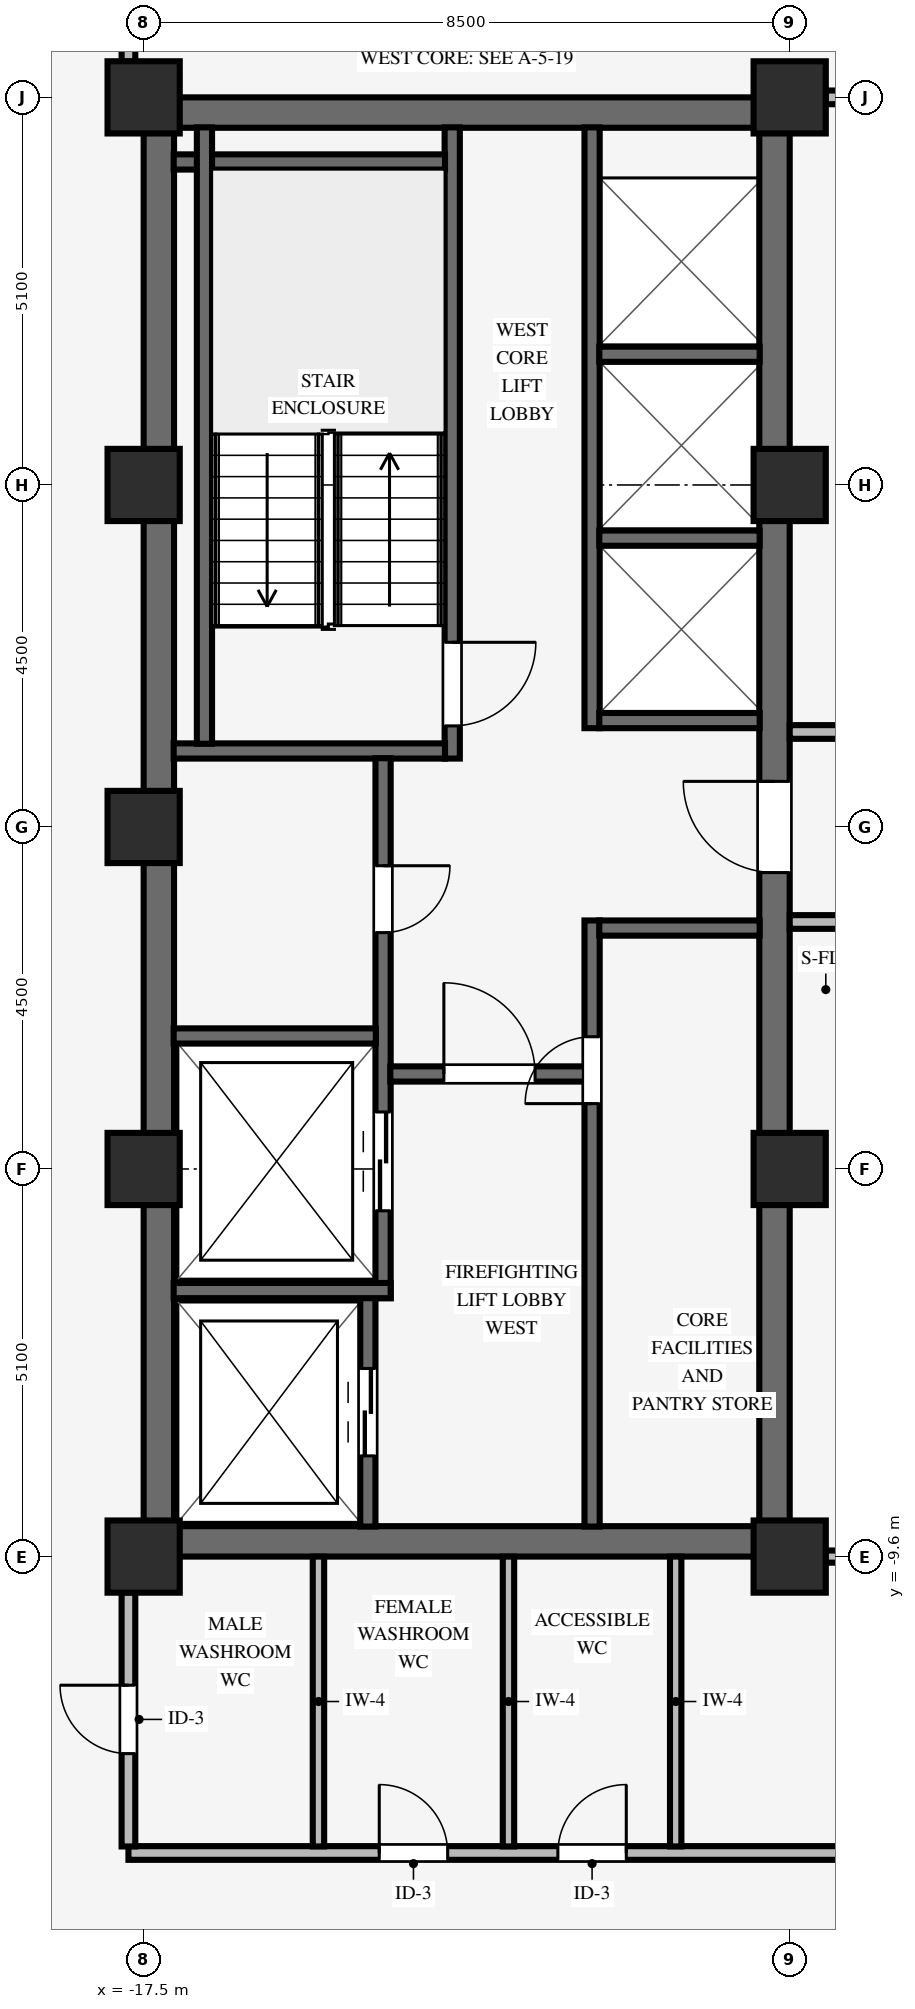
"""IFC4 building model, lengths in metres.
Left out: names, types, materials, properties, quantities, classifications, styles, units other than length and angle.
Written with IfcOpenShell. Run it as: python <this file> out.ifc"""

import sys

from ifc_helpers import new_model, si_unit, direction, frame, frame_2d, origin, origin_2d, place, context, subcontext, project, spatial, rectangle, extrude, source, transform, mapped, element, fill, save


model = new_model("IFC4")
c1 = context("Model", 3, precision=1e-05, world=origin(), true_north=direction((0.0, 1.0)))
c2 = subcontext(c1, "Body", "Model", "MODEL_VIEW")
j1 = project(units=[si_unit("LENGTHUNIT", "METRE"), si_unit("PLANEANGLEUNIT", "RADIAN")], contexts=[c1])
p1 = place(None, origin())
s1 = spatial("IfcSite", under=j1, at=p1, CompositionType="ELEMENT")
p2 = place(p1, origin())
s2 = spatial("IfcBuilding", under=s1, at=p2, CompositionType="ELEMENT")
p3 = place(p2, frame((0.0, 0.0, 167.65)))
s3 = spatial("IfcBuildingStorey", under=s2, at=p3, CompositionType="ELEMENT", Elevation=167.65)
for number, where, z_axis, x_axis in (
    (1, (-17.5, -9.4, 0.0), (0.0, 0.0, 1.0), (1.0, 0.0, 0.0)),
    (2, (-17.5, 9.4, 0.0), (0.0, 0.0, 1.0), (1.0, 0.0, 0.0)),
):
    element("IfcWall", number, at=place(p3, frame(where, z_axis=z_axis, x_axis=x_axis)), inside=s3, PredefinedType="SHEAR", context=c2, shape_type="SweptSolid", body=[
        extrude(rectangle(XDim=8.5, YDim=0.4, at=frame_2d((4.25, 0.0))), origin(), (0.0, 0.0, 1.0), 3.37),
    ])
p4 = place(p3, frame((-17.3, -9.205, 0.0), z_axis=(0.0, 0.0, 1.0), x_axis=(0.0, 1.0, 0.0)))
e3 = element("IfcWall", 3, at=p4, inside=s3, PredefinedType="SHEAR", context=c2, shape_type="SweptSolid", body=[
    extrude(rectangle(XDim=18.41, YDim=0.4, at=frame_2d((9.205, 0.0))), origin(), (0.0, 0.0, 1.0), 3.37),
])
p5 = place(p3, frame((-9.2, -9.205, 0.0), z_axis=(0.0, 0.0, 1.0), x_axis=(0.0, 1.0, 0.0)))
e4 = element("IfcWall", 4, at=p5, inside=s3, PredefinedType="SHEAR", context=c2, shape_type="SweptSolid", body=[
    extrude(rectangle(XDim=18.41, YDim=0.4, at=frame_2d((9.205, 0.0))), origin(), (0.0, 0.0, 1.0), 3.37),
])
p6 = place(p5, frame((8.605, 0.0, 0.0)))
e5 = element("IfcOpeningElement", 5, at=p6, cuts=e4, PredefinedType="OPENING", context=c2, shape_type="SweptSolid", body=[
    extrude(rectangle(XDim=1.2, YDim=2.15, at=frame_2d((0.6, 1.075))), frame((0.0, 0.21, 0.0), z_axis=(0.0, -1.0, 0.0), x_axis=(1.0, 0.0, 0.0)), (0.0, 0.0, 1.0), 0.42),
])
for number, where, z_axis, x_axis in (
    (6, (-17.5, -9.6, 0.0), (0.0, 0.0, 1.0), (1.0, 0.0, 0.0)),
    (7, (-17.5, -4.5, 0.0), (0.0, 0.0, 1.0), (1.0, 0.0, 0.0)),
    (8, (-17.5, 4.5, 0.0), (0.0, 0.0, 1.0), (1.0, 0.0, 0.0)),
    (9, (-17.5, 9.6, 0.0), (0.0, 0.0, 1.0), (1.0, 0.0, 0.0)),
    (10, (-9.0, -9.6, 0.0), (0.0, 0.0, 1.0), (1.0, 0.0, 0.0)),
    (11, (-9.0, -4.5, 0.0), (0.0, 0.0, 1.0), (1.0, 0.0, 0.0)),
    (12, (-9.0, 4.5, 0.0), (0.0, 0.0, 1.0), (1.0, 0.0, 0.0)),
    (13, (-9.0, 9.6, 0.0), (0.0, 0.0, 1.0), (1.0, 0.0, 0.0)),
    (14, (-17.5, 0.0, 0.0), (0.0, 0.0, 1.0), (1.0, 0.0, 0.0)),
):
    element("IfcColumn", number, at=place(p3, frame(where, z_axis=z_axis, x_axis=x_axis)), inside=s3, PredefinedType="COLUMN", context=c2, shape_type="SweptSolid", body=[
        extrude(rectangle(XDim=0.95, YDim=0.95, at=origin_2d()), origin(), (0.0, 0.0, 1.0), 3.37),
    ])
p7 = place(p3, frame((-13.44, 0.9, 0.0), z_axis=(0.0, 0.0, 1.0), x_axis=(0.0, 1.0, 0.0)))
e15 = element("IfcWall", 15, at=p7, inside=s3, PredefinedType="SHEAR", context=c2, shape_type="SweptSolid", body=[
    extrude(rectangle(XDim=8.305, YDim=0.2, at=frame_2d((4.153, 0.0))), origin(), (0.0, 0.0, 1.0), 3.37),
])
p8 = place(p7, frame((1.53, 0.0, 0.0), z_axis=(0.0, 0.0, 1.0), x_axis=(-1.0, 0.0, 0.0)))
e16 = element("IfcOpeningElement", 16, at=p8, cuts=e15, PredefinedType="OPENING", context=c2, shape_type="SweptSolid", body=[
    extrude(rectangle(XDim=1.1, YDim=2.15, at=frame_2d((0.55, 1.075))), frame((0.0, 0.11, 0.0), z_axis=(0.0, -1.0, 0.0), x_axis=(1.0, 0.0, 0.0)), (0.0, 0.0, 1.0), 0.22),
])
for number, where, z_axis, x_axis in (
    (17, (-17.105, 1.0, 0.0), (0.0, 0.0, 1.0), (1.0, 0.0, 0.0)),
    (18, (-17.105, 8.75, 0.0), (0.0, 0.0, 1.0), (1.0, 0.0, 0.0)),
):
    element("IfcWall", number, at=place(p3, frame(where, z_axis=z_axis, x_axis=x_axis)), inside=s3, PredefinedType="SHEAR", context=c2, shape_type="SweptSolid", body=[
        extrude(rectangle(XDim=3.57, YDim=0.2, at=frame_2d((1.785, 0.0))), origin(), (0.0, 0.0, 1.0), 3.37),
    ])
p9 = place(p3, frame((-16.7, 1.095, 0.0), z_axis=(0.0, 0.0, 1.0), x_axis=(0.0, 1.0, 0.0)))
e19 = element("IfcWall", 19, at=p9, inside=s3, PredefinedType="SHEAR", context=c2, shape_type="SweptSolid", body=[
    extrude(rectangle(XDim=8.11, YDim=0.2, at=frame_2d((4.055, 0.0))), origin(), (0.0, 0.0, 1.0), 3.37),
])
p10 = place(p3, frame((-14.55, -9.205, 0.0), z_axis=(0.0, 0.0, 1.0), x_axis=(0.0, 1.0, 0.0)))
e20 = element("IfcWall", 20, at=p10, inside=s3, PredefinedType="SHEAR", context=c2, shape_type="SweptSolid", body=[
    extrude(rectangle(XDim=3.01, YDim=0.2, at=frame_2d((1.505, 0.0))), origin(), (0.0, 0.0, 1.0), 3.37),
])
p11 = place(p10, frame((0.93, 0.0, 0.0)))
e21 = element("IfcOpeningElement", 21, at=p11, cuts=e20, PredefinedType="OPENING", context=c2, shape_type="SweptSolid", body=[
    extrude(rectangle(XDim=1.15, YDim=2.15, at=frame_2d((0.575, 1.075))), frame((0.0, 0.11, 0.0), z_axis=(0.0, -1.0, 0.0), x_axis=(1.0, 0.0, 0.0)), (0.0, 0.0, 1.0), 0.22),
])
p12 = place(p3, frame((-14.35, -6.2, 0.0), z_axis=(0.0, 0.0, 1.0), x_axis=(0.0, 1.0, 0.0)))
e22 = element("IfcWall", 22, at=p12, inside=s3, PredefinedType="SHEAR", context=c2, shape_type="SweptSolid", body=[
    extrude(rectangle(XDim=7.105, YDim=0.2, at=frame_2d((3.552, 0.0))), origin(), (0.0, 0.0, 1.0), 3.37),
])
p13 = place(p12, frame((5.69, 0.0, 0.0), z_axis=(0.0, 0.0, 1.0), x_axis=(-1.0, 0.0, 0.0)))
e23 = element("IfcOpeningElement", 23, at=p13, cuts=e22, PredefinedType="OPENING", context=c2, shape_type="SweptSolid", body=[
    extrude(rectangle(XDim=0.88, YDim=2.1, at=frame_2d((0.44, 1.05))), frame((0.0, 0.11, 0.0), z_axis=(0.0, -1.0, 0.0), x_axis=(1.0, 0.0, 0.0)), (0.0, 0.0, 1.0), 0.22),
])
p14 = place(p12, frame((1.15, 0.0, 0.0)))
e24 = element("IfcOpeningElement", 24, at=p14, cuts=e22, PredefinedType="OPENING", context=c2, shape_type="SweptSolid", body=[
    extrude(rectangle(XDim=1.3, YDim=2.2, at=frame_2d((0.65, 1.1))), frame((0.0, 0.11, 0.0), z_axis=(0.0, -1.0, 0.0), x_axis=(1.0, 0.0, 0.0)), (0.0, 0.0, 1.0), 0.22),
])
p15 = place(p3, frame((-17.105, -6.1, 0.0), z_axis=(0.0, 0.0, 1.0), x_axis=(1.0, 0.0, 0.0)))
e25 = element("IfcWall", 25, at=p15, inside=s3, PredefinedType="SHEAR", context=c2, shape_type="SweptSolid", body=[
    extrude(rectangle(XDim=2.855, YDim=0.2, at=frame_2d((1.427, 0.0))), origin(), (0.0, 0.0, 1.0), 3.37),
])
p16 = place(p3, frame((-17.105, -2.75, 0.0), z_axis=(0.0, 0.0, 1.0), x_axis=(1.0, 0.0, 0.0)))
e26 = element("IfcWall", 26, at=p16, inside=s3, PredefinedType="SHEAR", context=c2, shape_type="SweptSolid", body=[
    extrude(rectangle(XDim=2.66, YDim=0.2, at=frame_2d((1.33, 0.0))), origin(), (0.0, 0.0, 1.0), 3.37),
])
p17 = place(p3, frame((-11.6, -9.205, 0.0), z_axis=(0.0, 0.0, 1.0), x_axis=(0.0, 1.0, 0.0)))
e27 = element("IfcWall", 27, at=p17, inside=s3, PredefinedType="SHEAR", context=c2, shape_type="SweptSolid", body=[
    extrude(rectangle(XDim=7.975, YDim=0.2, at=frame_2d((3.988, 0.0))), origin(), (0.0, 0.0, 1.0), 3.37),
])
p18 = place(p17, frame((5.565, 0.0, 0.0)))
e28 = element("IfcOpeningElement", 28, at=p18, cuts=e27, PredefinedType="OPENING", context=c2, shape_type="SweptSolid", body=[
    extrude(rectangle(XDim=0.88, YDim=2.1, at=frame_2d((0.44, 1.05))), frame((0.0, 0.11, 0.0), z_axis=(0.0, -1.0, 0.0), x_axis=(1.0, 0.0, 0.0)), (0.0, 0.0, 1.0), 0.22),
])
p19 = place(p3, frame((-14.255, -3.25, 0.0), z_axis=(0.0, 0.0, 1.0), x_axis=(1.0, 0.0, 0.0)))
e29 = element("IfcWall", 29, at=p19, inside=s3, PredefinedType="SHEAR", context=c2, shape_type="SweptSolid", body=[
    extrude(rectangle(XDim=2.56, YDim=0.2, at=frame_2d((1.28, 0.0))), origin(), (0.0, 0.0, 1.0), 3.37),
])
p20 = place(p19, frame((0.705, 0.0, 0.0)))
e30 = element("IfcOpeningElement", 30, at=p20, cuts=e29, PredefinedType="OPENING", context=c2, shape_type="SweptSolid", body=[
    extrude(rectangle(XDim=1.2, YDim=2.15, at=frame_2d((0.6, 1.075))), frame((0.0, 0.11, 0.0), z_axis=(0.0, -1.0, 0.0), x_axis=(1.0, 0.0, 0.0)), (0.0, 0.0, 1.0), 0.22),
])
p21 = place(p3, frame((-11.505, -1.33, 0.0), z_axis=(0.0, 0.0, 1.0), x_axis=(1.0, 0.0, 0.0)))
e31 = element("IfcWall", 31, at=p21, inside=s3, PredefinedType="SHEAR", context=c2, shape_type="SweptSolid", body=[
    extrude(rectangle(XDim=2.11, YDim=0.2, at=frame_2d((1.055, 0.0))), origin(), (0.0, 0.0, 1.0), 3.37),
])
p22 = place(p3, frame((-11.6, 1.3, 0.0), z_axis=(0.0, 0.0, 1.0), x_axis=(0.0, 1.0, 0.0)))
e32 = element("IfcWall", 32, at=p22, inside=s3, PredefinedType="SHEAR", context=c2, shape_type="SweptSolid", body=[
    extrude(rectangle(XDim=7.905, YDim=0.2, at=frame_2d((3.953, 0.0))), origin(), (0.0, 0.0, 1.0), 3.37),
])
for number, where, z_axis, x_axis in (
    (33, (-11.505, 1.4, 0.0), (0.0, 0.0, 1.0), (1.0, 0.0, 0.0)),
    (34, (-11.505, 3.8, 0.0), (0.0, 0.0, 1.0), (1.0, 0.0, 0.0)),
    (35, (-11.505, 6.22, 0.0), (0.0, 0.0, 1.0), (1.0, 0.0, 0.0)),
):
    element("IfcWall", number, at=place(p3, frame(where, z_axis=z_axis, x_axis=x_axis)), inside=s3, PredefinedType="SHEAR", context=c2, shape_type="SweptSolid", body=[
        extrude(rectangle(XDim=2.11, YDim=0.2, at=frame_2d((1.055, 0.0))), origin(), (0.0, 0.0, 1.0), 3.37),
    ])
p23 = place(p3, frame((-17.7, -13.5, 0.0), z_axis=(0.0, 0.0, 1.0), x_axis=(1.0, 0.0, 0.0)))
e36 = element("IfcWall", 36, at=p23, inside=s3, PredefinedType="PARTITIONING", context=c2, shape_type="SweptSolid", body=[
    extrude(rectangle(XDim=24.3, YDim=0.18, at=frame_2d((12.15, 0.0))), origin(), (0.0, 0.0, 1.0), 3.008),
])
p24 = place(p23, frame((11.97, 0.0, 0.0)))
e37 = element("IfcOpeningElement", 37, at=p24, cuts=e36, PredefinedType="OPENING", context=c2, shape_type="SweptSolid", body=[
    extrude(rectangle(XDim=0.96, YDim=2.1, at=frame_2d((0.48, 1.05))), frame((0.0, 0.1, 0.0), z_axis=(0.0, -1.0, 0.0), x_axis=(1.0, 0.0, 0.0)), (0.0, 0.0, 1.0), 0.2),
])
p25 = place(p23, frame((20.52, 0.0, 0.0)))
e38 = element("IfcOpeningElement", 38, at=p25, cuts=e36, PredefinedType="OPENING", context=c2, shape_type="SweptSolid", body=[
    extrude(rectangle(XDim=0.96, YDim=2.1, at=frame_2d((0.48, 1.05))), frame((0.0, 0.1, 0.0), z_axis=(0.0, -1.0, 0.0), x_axis=(1.0, 0.0, 0.0)), (0.0, 0.0, 1.0), 0.2),
])
p26 = place(p23, frame((3.3, 0.0, 0.0)))
e39 = element("IfcOpeningElement", 39, at=p26, cuts=e36, PredefinedType="OPENING", context=c2, shape_type="SweptSolid", body=[
    extrude(rectangle(XDim=0.9, YDim=2.1, at=frame_2d((0.45, 1.05))), frame((0.0, 0.1, 0.0), z_axis=(0.0, -1.0, 0.0), x_axis=(1.0, 0.0, 0.0)), (0.0, 0.0, 1.0), 0.2),
])
p27 = place(p23, frame((5.65, 0.0, 0.0)))
e40 = element("IfcOpeningElement", 40, at=p27, cuts=e36, PredefinedType="OPENING", context=c2, shape_type="SweptSolid", body=[
    extrude(rectangle(XDim=0.9, YDim=2.1, at=frame_2d((0.45, 1.05))), frame((0.0, 0.1, 0.0), z_axis=(0.0, -1.0, 0.0), x_axis=(1.0, 0.0, 0.0)), (0.0, 0.0, 1.0), 0.2),
])
p28 = place(p3, frame((-8.529, -9.6, 0.0), z_axis=(0.0, 0.0, 1.0), x_axis=(1.0, 0.0, 0.0)))
e41 = element("IfcWall", 41, at=p28, inside=s3, PredefinedType="PARTITIONING", context=c2, shape_type="SweptSolid", body=[
    extrude(rectangle(XDim=8.378, YDim=0.16, at=frame_2d((4.189, 0.0))), origin(), (0.0, 0.0, 1.0), 2.405),
])
p29 = place(p3, frame((-9.0, -1.25, 0.0), z_axis=(0.0, 0.0, 1.0), x_axis=(1.0, 0.0, 0.0)))
e42 = element("IfcWall", 42, at=p29, inside=s3, PredefinedType="PARTITIONING", context=c2, shape_type="SweptSolid", body=[
    extrude(rectangle(XDim=15.6, YDim=0.18, at=frame_2d((7.8, 0.0))), origin(), (0.0, 0.0, 1.0), 3.36),
])
p30 = place(p29, frame((4.67, 0.0, 0.0)))
e43 = element("IfcOpeningElement", 43, at=p30, cuts=e42, PredefinedType="OPENING", context=c2, shape_type="SweptSolid", body=[
    extrude(rectangle(XDim=0.96, YDim=2.1, at=frame_2d((0.48, 1.05))), frame((0.0, 0.1, 0.0), z_axis=(0.0, -1.0, 0.0), x_axis=(1.0, 0.0, 0.0)), (0.0, 0.0, 1.0), 0.2),
])
p31 = place(p3, frame((-9.0, 1.25, 0.0), z_axis=(0.0, 0.0, 1.0), x_axis=(1.0, 0.0, 0.0)))
e44 = element("IfcWall", 44, at=p31, inside=s3, PredefinedType="PARTITIONING", context=c2, shape_type="SweptSolid", body=[
    extrude(rectangle(XDim=15.6, YDim=0.18, at=frame_2d((7.8, 0.0))), origin(), (0.0, 0.0, 1.0), 3.36),
])
p32 = place(p31, frame((3.37, 0.0, 0.0)))
e45 = element("IfcOpeningElement", 45, at=p32, cuts=e44, PredefinedType="OPENING", context=c2, shape_type="SweptSolid", body=[
    extrude(rectangle(XDim=0.96, YDim=2.1, at=frame_2d((0.48, 1.05))), frame((0.0, 0.1, 0.0), z_axis=(0.0, -1.0, 0.0), x_axis=(1.0, 0.0, 0.0)), (0.0, 0.0, 1.0), 0.2),
])
p33 = place(p3, frame((-8.529, 9.6, 0.0), z_axis=(0.0, 0.0, 1.0), x_axis=(1.0, 0.0, 0.0)))
e46 = element("IfcWall", 46, at=p33, inside=s3, PredefinedType="PARTITIONING", context=c2, shape_type="SweptSolid", body=[
    extrude(rectangle(XDim=8.378, YDim=0.18, at=frame_2d((4.189, 0.0))), origin(), (0.0, 0.0, 1.0), 2.405),
])
p34 = place(p3, frame((-17.7, -13.414, 0.0), z_axis=(0.0, 0.0, 1.0), x_axis=(0.0, 1.0, 0.0)))
e47 = element("IfcWall", 47, at=p34, inside=s3, PredefinedType="PARTITIONING", context=c2, shape_type="SweptSolid", body=[
    extrude(rectangle(XDim=3.343, YDim=0.18, at=frame_2d((1.671, 0.0))), origin(), (0.0, 0.0, 1.0), 2.816),
])
p35 = place(p34, frame((1.221, 0.0, 0.0)))
e48 = element("IfcOpeningElement", 48, at=p35, cuts=e47, PredefinedType="OPENING", context=c2, shape_type="SweptSolid", body=[
    extrude(rectangle(XDim=0.9, YDim=2.1, at=frame_2d((0.45, 1.05))), frame((0.0, 0.1, 0.0), z_axis=(0.0, -1.0, 0.0), x_axis=(1.0, 0.0, 0.0)), (0.0, 0.0, 1.0), 0.2),
])
p36 = place(p3, frame((-17.7, 10.071, 0.0), z_axis=(0.0, 0.0, 1.0), x_axis=(0.0, 1.0, 0.0)))
e49 = element("IfcWall", 49, at=p36, inside=s3, PredefinedType="PARTITIONING", context=c2, shape_type="SweptSolid", body=[
    extrude(rectangle(XDim=3.343, YDim=0.18, at=frame_2d((1.671, 0.0))), origin(), (0.0, 0.0, 1.0), 2.816),
])
for number, where, z_axis, x_axis in (
    (50, (-15.2, -13.414, 0.0), (0.0, 0.0, 1.0), (0.0, 1.0, 0.0)),
    (51, (-12.7, -13.414, 0.0), (0.0, 0.0, 1.0), (0.0, 1.0, 0.0)),
    (52, (-10.5, -13.414, 0.0), (0.0, 0.0, 1.0), (0.0, 1.0, 0.0)),
):
    element("IfcWall", number, at=place(p3, frame(where, z_axis=z_axis, x_axis=x_axis)), inside=s3, PredefinedType="PARTITIONING", context=c2, shape_type="SweptSolid", body=[
        extrude(rectangle(XDim=3.814, YDim=0.15, at=frame_2d((1.907, 0.0))), origin(), (0.0, 0.0, 1.0), 3.36),
    ])
m1 = source(origin(), c2, "Body", "SweptSolid", [
    extrude(rectangle(XDim=1.1, YDim=2.15, at=frame_2d((0.55, 1.075))), frame((0.0, 0.025, 0.0), z_axis=(0.0, -1.0, 0.0), x_axis=(1.0, 0.0, 0.0)), (0.0, 0.0, 1.0), 0.05),
])
p37 = place(p8, origin())
e53 = element("IfcDoor", 53, at=p37, inside=s3, OperationType="SINGLE_SWING_LEFT", PredefinedType="DOOR", context=c2, shape_type="MappedRepresentation", body=[
    mapped(m1, transform((0.0, 0.0, 0.0), scale=1.0)),
])
fill(e16, e53)
m2 = source(origin(), c2, "Body", "SweptSolid", [
    extrude(rectangle(XDim=0.88, YDim=2.1, at=frame_2d((0.44, 1.05))), frame((0.0, 0.025, 0.0), z_axis=(0.0, -1.0, 0.0), x_axis=(1.0, 0.0, 0.0)), (0.0, 0.0, 1.0), 0.05),
])
p38 = place(p13, origin())
e54 = element("IfcDoor", 54, at=p38, inside=s3, OperationType="SINGLE_SWING_LEFT", PredefinedType="DOOR", context=c2, shape_type="MappedRepresentation", body=[
    mapped(m2, transform((0.0, 0.0, 0.0), scale=1.0)),
])
fill(e23, e54)
m3 = source(origin(), c2, "Body", "SweptSolid", [
    extrude(rectangle(XDim=1.2, YDim=2.15, at=frame_2d((0.6, 1.075))), frame((0.0, 0.025, 0.0), z_axis=(0.0, -1.0, 0.0), x_axis=(1.0, 0.0, 0.0)), (0.0, 0.0, 1.0), 0.05),
])
p39 = place(p20, origin())
e55 = element("IfcDoor", 55, at=p39, inside=s3, OperationType="SINGLE_SWING_LEFT", PredefinedType="DOOR", context=c2, shape_type="MappedRepresentation", body=[
    mapped(m3, transform((0.0, 0.0, 0.0), scale=1.0)),
])
fill(e30, e55)
p40 = place(p18, origin())
e56 = element("IfcDoor", 56, at=p40, inside=s3, OperationType="SINGLE_SWING_LEFT", PredefinedType="DOOR", context=c2, shape_type="MappedRepresentation", body=[
    mapped(m2, transform((0.0, 0.0, 0.0), scale=1.0)),
])
fill(e28, e56)
p41 = place(p6, origin())
e57 = element("IfcDoor", 57, at=p41, inside=s3, OperationType="SINGLE_SWING_RIGHT", PredefinedType="DOOR", context=c2, shape_type="MappedRepresentation", body=[
    mapped(m3, transform((0.0, 0.0, 0.0), scale=1.0)),
])
fill(e5, e57)
m4 = source(origin(), c2, "Body", "SweptSolid", [
    extrude(rectangle(XDim=1.15, YDim=2.15, at=frame_2d((0.575, 1.075))), frame((0.0, 0.025, 0.0), z_axis=(0.0, -1.0, 0.0), x_axis=(1.0, 0.0, 0.0)), (0.0, 0.0, 1.0), 0.05),
])
p42 = place(p11, origin())
e58 = element("IfcDoor", 58, at=p42, inside=s3, OperationType="DOUBLE_DOOR_SLIDING", PredefinedType="DOOR", context=c2, shape_type="MappedRepresentation", body=[
    mapped(m4, transform((0.0, 0.0, 0.0), scale=1.0)),
])
fill(e21, e58)
m5 = source(origin(), c2, "Body", "SweptSolid", [
    extrude(rectangle(XDim=1.3, YDim=2.2, at=frame_2d((0.65, 1.1))), frame((0.0, 0.025, 0.0), z_axis=(0.0, -1.0, 0.0), x_axis=(1.0, 0.0, 0.0)), (0.0, 0.0, 1.0), 0.05),
])
p43 = place(p14, origin())
e59 = element("IfcDoor", 59, at=p43, inside=s3, OperationType="DOUBLE_DOOR_SLIDING", PredefinedType="DOOR", context=c2, shape_type="MappedRepresentation", body=[
    mapped(m5, transform((0.0, 0.0, 0.0), scale=1.0)),
])
fill(e24, e59)
m6 = source(origin(), c2, "Body", "SweptSolid", [
    extrude(rectangle(XDim=0.9, YDim=2.1, at=frame_2d((0.45, 1.05))), frame((0.0, 0.025, 0.0), z_axis=(0.0, -1.0, 0.0), x_axis=(1.0, 0.0, 0.0)), (0.0, 0.0, 1.0), 0.05),
])
p44 = place(p35, origin())
e60 = element("IfcDoor", 60, at=p44, inside=s3, OperationType="SINGLE_SWING_RIGHT", PredefinedType="DOOR", context=c2, shape_type="MappedRepresentation", body=[
    mapped(m6, transform((0.0, 0.0, 0.0), scale=1.0)),
])
fill(e48, e60)
p45 = place(p26, origin())
e61 = element("IfcDoor", 61, at=p45, inside=s3, OperationType="SINGLE_SWING_LEFT", PredefinedType="DOOR", context=c2, shape_type="MappedRepresentation", body=[
    mapped(m6, transform((0.0, 0.0, 0.0), scale=1.0)),
])
fill(e39, e61)
p46 = place(p27, origin())
e62 = element("IfcDoor", 62, at=p46, inside=s3, OperationType="SINGLE_SWING_RIGHT", PredefinedType="DOOR", context=c2, shape_type="MappedRepresentation", body=[
    mapped(m6, transform((0.0, 0.0, 0.0), scale=1.0)),
])
fill(e40, e62)
save(model, sys.argv[1])
